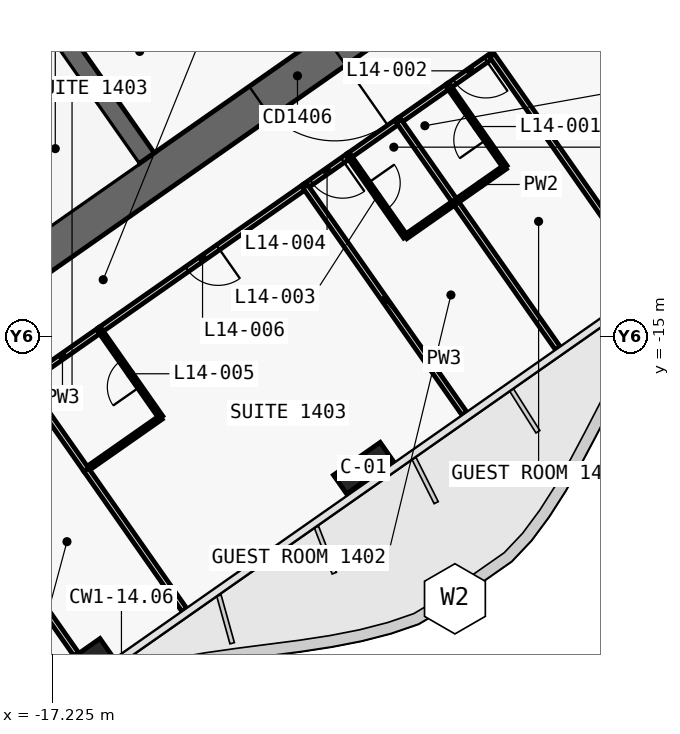
"""IFC4 building model, lengths in metres.
Left out: names, types, materials, properties, quantities, classifications, styles, units other than length and angle.
Written with IfcOpenShell. Run it as: python <this file> out.ifc"""

import sys

from ifc_helpers import new_model, si_unit, direction, frame, frame_2d, origin, origin_2d, place, context, subcontext, project, spatial, polyline, rectangle, outline, extrude, element, fill, save


model = new_model("IFC4")
c1 = context("Model", 3, precision=1e-05, world=origin(), true_north=direction((0.0, 1.0)))
c2 = subcontext(c1, "Body", "Model", "MODEL_VIEW")
j1 = project(units=[si_unit("LENGTHUNIT", "METRE"), si_unit("PLANEANGLEUNIT", "RADIAN")], contexts=[c1])
p1 = place(None, origin())
s1 = spatial("IfcSite", under=j1, at=p1, CompositionType="ELEMENT")
p2 = place(p1, origin())
s2 = spatial("IfcBuilding", under=s1, at=p2, CompositionType="ELEMENT")
p3 = place(p2, frame((0.0, 0.0, 76.1)))
s3 = spatial("IfcBuildingStorey", under=s2, at=p3, CompositionType="ELEMENT", Elevation=76.1)
p4 = place(p3, frame((0.037, 11.867, 0.0), z_axis=(0.0, 0.0, 1.0), x_axis=(-0.819155306259, -0.573571777746, 0.0)))
e1 = element("IfcWall", 1, at=p4, inside=s3, PredefinedType="SHEAR", context=c2, shape_type="SweptSolid", body=[
    extrude(outline(polyline([(33.837, 0.5), (0.7, 0.5), (0.0, -0.5), (33.837, -0.5), (33.837, 0.5)])), origin(), (0.0, 0.0, 1.0), 3.6),
])
p5 = place(p3, frame((0.037, -0.585, 0.0), z_axis=(0.0, 0.0, 1.0), x_axis=(-0.819157152511, -0.573569140985, 0.0)))
e2 = element("IfcWall", 2, at=p5, inside=s3, PredefinedType="SHEAR", context=c2, shape_type="SweptSolid", body=[
    extrude(outline(polyline([(26.695, 0.5), (0.7, 0.5), (0.0, -0.5), (26.695, -0.5), (26.695, 0.5)])), origin(), (0.0, 0.0, 1.0), 3.6),
])
p6 = place(p5, frame((2.995, 0.0, 0.0)))
e3 = element("IfcOpeningElement", 3, at=p6, cuts=e2, PredefinedType="OPENING", context=c2, shape_type="SweptSolid", body=[
    extrude(rectangle(XDim=2.4, YDim=2.1, at=frame_2d((1.2, 1.05))), frame((0.0, 0.51, 0.0), z_axis=(0.0, -1.0, 0.0), x_axis=(1.0, 0.0, 0.0)), (0.0, 0.0, 1.0), 1.02),
])
p7 = place(p5, frame((11.995, 0.0, 0.0)))
e4 = element("IfcOpeningElement", 4, at=p7, cuts=e2, PredefinedType="OPENING", context=c2, shape_type="SweptSolid", body=[
    extrude(rectangle(XDim=2.4, YDim=2.1, at=frame_2d((1.2, 1.05))), frame((0.0, 0.51, 0.0), z_axis=(0.0, -1.0, 0.0), x_axis=(1.0, 0.0, 0.0)), (0.0, 0.0, 1.0), 1.02),
])
p8 = place(p3, frame((-14.745, -10.324, 0.0), z_axis=(0.0, 0.0, 1.0), x_axis=(-0.57356780395, 0.819158088694, 0.0)))
e5 = element("IfcWall", 5, at=p8, inside=s3, PredefinedType="SHEAR", context=c2, shape_type="SweptSolid", body=[
    extrude(outline(polyline([(4.35, 0.25), (0.0, 0.25), (0.0, -0.25), (4.35, -0.25), (4.35, 0.25)])), origin(), (0.0, 0.0, 1.0), 3.6),
])
p9 = place(p3, frame((-2.638, 3.768, 0.0), z_axis=(0.0, 0.0, 1.0), x_axis=(-0.819148977158, -0.573580816643, 0.0)))
e6 = element("IfcWall", 6, at=p9, inside=s3, PredefinedType="SHEAR", context=c2, shape_type="SweptSolid", body=[
    extrude(outline(polyline([(26.0, 0.25), (0.0, 0.25), (0.0, -0.25), (26.0, -0.25), (26.0, 0.25)])), origin(), (0.0, 0.0, 1.0), 3.6),
])
p10 = place(p9, frame((1.169, 0.0, 0.0)))
e7 = element("IfcOpeningElement", 7, at=p10, cuts=e6, PredefinedType="OPENING", context=c2, shape_type="SweptSolid", body=[
    extrude(rectangle(XDim=1.1, YDim=2.1, at=frame_2d((0.55, 1.05))), frame((0.0, 0.26, 0.0), z_axis=(0.0, -1.0, 0.0), x_axis=(1.0, 0.0, 0.0)), (0.0, 0.0, 1.0), 0.52),
])
p11 = place(p9, frame((3.206, 0.0, 0.0)))
e8 = element("IfcOpeningElement", 8, at=p11, cuts=e6, PredefinedType="OPENING", context=c2, shape_type="SweptSolid", body=[
    extrude(rectangle(XDim=1.1, YDim=2.1, at=frame_2d((0.55, 1.05))), frame((0.0, 0.26, 0.0), z_axis=(0.0, -1.0, 0.0), x_axis=(1.0, 0.0, 0.0)), (0.0, 0.0, 1.0), 0.52),
])
p12 = place(p9, frame((5.244, 0.0, 0.0)))
e9 = element("IfcOpeningElement", 9, at=p12, cuts=e6, PredefinedType="OPENING", context=c2, shape_type="SweptSolid", body=[
    extrude(rectangle(XDim=1.1, YDim=2.1, at=frame_2d((0.55, 1.05))), frame((0.0, 0.26, 0.0), z_axis=(0.0, -1.0, 0.0), x_axis=(1.0, 0.0, 0.0)), (0.0, 0.0, 1.0), 0.52),
])
p13 = place(p9, frame((7.281, 0.0, 0.0)))
e10 = element("IfcOpeningElement", 10, at=p13, cuts=e6, PredefinedType="OPENING", context=c2, shape_type="SweptSolid", body=[
    extrude(rectangle(XDim=1.1, YDim=2.1, at=frame_2d((0.55, 1.05))), frame((0.0, 0.26, 0.0), z_axis=(0.0, -1.0, 0.0), x_axis=(1.0, 0.0, 0.0)), (0.0, 0.0, 1.0), 0.52),
])
p14 = place(p9, frame((9.688, 0.0, 0.0)))
e11 = element("IfcOpeningElement", 11, at=p14, cuts=e6, PredefinedType="OPENING", context=c2, shape_type="SweptSolid", body=[
    extrude(rectangle(XDim=1.1, YDim=2.1, at=frame_2d((0.55, 1.05))), frame((0.0, 0.26, 0.0), z_axis=(0.0, -1.0, 0.0), x_axis=(1.0, 0.0, 0.0)), (0.0, 0.0, 1.0), 0.52),
])
p15 = place(p9, frame((11.863, 0.0, 0.0)))
e12 = element("IfcOpeningElement", 12, at=p15, cuts=e6, PredefinedType="OPENING", context=c2, shape_type="SweptSolid", body=[
    extrude(rectangle(XDim=1.1, YDim=2.1, at=frame_2d((0.55, 1.05))), frame((0.0, 0.26, 0.0), z_axis=(0.0, -1.0, 0.0), x_axis=(1.0, 0.0, 0.0)), (0.0, 0.0, 1.0), 0.52),
])
p16 = place(p9, frame((14.038, 0.0, 0.0)))
e13 = element("IfcOpeningElement", 13, at=p16, cuts=e6, PredefinedType="OPENING", context=c2, shape_type="SweptSolid", body=[
    extrude(rectangle(XDim=1.1, YDim=2.1, at=frame_2d((0.55, 1.05))), frame((0.0, 0.26, 0.0), z_axis=(0.0, -1.0, 0.0), x_axis=(1.0, 0.0, 0.0)), (0.0, 0.0, 1.0), 0.52),
])
p17 = place(p9, frame((16.212, 0.0, 0.0)))
e14 = element("IfcOpeningElement", 14, at=p17, cuts=e6, PredefinedType="OPENING", context=c2, shape_type="SweptSolid", body=[
    extrude(rectangle(XDim=1.1, YDim=2.1, at=frame_2d((0.55, 1.05))), frame((0.0, 0.26, 0.0), z_axis=(0.0, -1.0, 0.0), x_axis=(1.0, 0.0, 0.0)), (0.0, 0.0, 1.0), 0.52),
])
for number, where, z_axis, x_axis in (
    (15, (-9.038, -18.475, 0.0), (0.0, 0.0, 1.0), (-0.819, -0.574, 0.0)),
    (16, (-16.41, -23.637, 0.0), (0.0, 0.0, 1.0), (-0.819, -0.574, 0.0)),
):
    element("IfcColumn", number, at=place(p3, frame(where, z_axis=z_axis, x_axis=x_axis)), inside=s3, PredefinedType="COLUMN", context=c2, shape_type="SweptSolid", body=[
        extrude(rectangle(XDim=1.5, YDim=0.6, at=origin_2d()), origin(), (0.0, 0.0, 1.0), 3.6),
    ])
p18 = place(p3, frame((-5.652, -7.62, 0.0), z_axis=(0.0, 0.0, 1.0), x_axis=(-0.819207359301, -0.573497430219, 0.0)))
e17 = element("IfcWall", 17, at=p18, inside=s3, PredefinedType="PARTITIONING", context=c2, shape_type="SweptSolid", body=[
    extrude(rectangle(XDim=1.401, YDim=0.15, at=frame_2d((0.7, 0.0))), origin(), (0.0, 0.0, 1.0), 2.6),
])
p19 = place(p18, frame((0.2, 0.0, 0.0)))
e18 = element("IfcOpeningElement", 18, at=p19, cuts=e17, PredefinedType="OPENING", context=c2, shape_type="SweptSolid", body=[
    extrude(rectangle(XDim=1.0, YDim=2.1, at=frame_2d((0.5, 1.05))), frame((0.0, 0.085, 0.0), z_axis=(0.0, -1.0, 0.0), x_axis=(1.0, 0.0, 0.0)), (0.0, 0.0, 1.0), 0.17),
])
p20 = place(p3, frame((-6.797, -8.421, 0.0), z_axis=(0.0, 0.0, 1.0), x_axis=(-0.8190674132, -0.573697283098, 0.0)))
e19 = element("IfcWall", 19, at=p20, inside=s3, PredefinedType="PARTITIONING", context=c2, shape_type="SweptSolid", body=[
    extrude(rectangle(XDim=1.604, YDim=0.15, at=frame_2d((0.802, 0.0))), origin(), (0.0, 0.0, 1.0), 3.32),
])
p21 = place(p3, frame((-9.419, -10.258, 0.0), z_axis=(0.0, 0.0, 1.0), x_axis=(-0.81914197737, -0.573590813132, 0.0)))
e20 = element("IfcWall", 20, at=p21, inside=s3, PredefinedType="PARTITIONING", context=c2, shape_type="SweptSolid", body=[
    extrude(rectangle(XDim=1.403, YDim=0.15, at=frame_2d((0.701, 0.0))), origin(), (0.0, 0.0, 1.0), 3.32),
])
p22 = place(p21, frame((0.201, 0.0, 0.0)))
e21 = element("IfcOpeningElement", 21, at=p22, cuts=e20, PredefinedType="OPENING", context=c2, shape_type="SweptSolid", body=[
    extrude(rectangle(XDim=1.0, YDim=2.1, at=frame_2d((0.5, 1.05))), frame((0.0, 0.085, 0.0), z_axis=(0.0, -1.0, 0.0), x_axis=(1.0, 0.0, 0.0)), (0.0, 0.0, 1.0), 0.17),
])
p23 = place(p3, frame((-8.107, -9.339, 0.0), z_axis=(0.0, 0.0, 1.0), x_axis=(-0.819117502046, -0.573625764625, 0.0)))
e22 = element("IfcWall", 22, at=p23, inside=s3, PredefinedType="PARTITIONING", context=c2, shape_type="SweptSolid", body=[
    extrude(rectangle(XDim=1.604, YDim=0.15, at=frame_2d((0.802, 0.0))), origin(), (0.0, 0.0, 1.0), 3.32),
])
p24 = place(p3, frame((-10.565, -11.06, 0.0), z_axis=(0.0, 0.0, 1.0), x_axis=(-0.819153746897, -0.573574004767, 0.0)))
e23 = element("IfcWall", 23, at=p24, inside=s3, PredefinedType="PARTITIONING", context=c2, shape_type="SweptSolid", body=[
    extrude(rectangle(XDim=6.603, YDim=0.15, at=frame_2d((3.302, 0.0))), origin(), (0.0, 0.0, 1.0), 2.6),
])
p25 = place(p24, frame((2.802, 0.0, 0.0)))
e24 = element("IfcOpeningElement", 24, at=p25, cuts=e23, PredefinedType="OPENING", context=c2, shape_type="SweptSolid", body=[
    extrude(rectangle(XDim=1.0, YDim=2.1, at=frame_2d((0.5, 1.05))), frame((0.0, 0.085, 0.0), z_axis=(0.0, -1.0, 0.0), x_axis=(1.0, 0.0, 0.0)), (0.0, 0.0, 1.0), 0.17),
])
p26 = place(p3, frame((-15.971, -14.846, 0.0), z_axis=(0.0, 0.0, 1.0), x_axis=(-0.81922714955, -0.573469159974, 0.0)))
e25 = element("IfcWall", 25, at=p26, inside=s3, PredefinedType="PARTITIONING", context=c2, shape_type="SweptSolid", body=[
    extrude(rectangle(XDim=2.404, YDim=0.15, at=frame_2d((1.202, 0.0))), origin(), (0.0, 0.0, 1.0), 3.32),
])
p27 = place(p3, frame((-1.849, -13.051, 0.0), z_axis=(0.0, 0.0, 1.0), x_axis=(-0.573575988258, 0.819152358047, 0.0)))
e26 = element("IfcWall", 26, at=p27, inside=s3, PredefinedType="PARTITIONING", context=c2, shape_type="SweptSolid", body=[
    extrude(rectangle(XDim=6.632, YDim=0.15, at=frame_2d((3.316, 0.0))), origin(), (0.0, 0.0, 1.0), 2.6),
])
p28 = place(p3, frame((-6.617, -11.471, 0.0), z_axis=(0.0, 0.0, 1.0), x_axis=(0.819131543282, 0.57360571371, 0.0)))
e27 = element("IfcWall", 27, at=p28, inside=s3, PredefinedType="PARTITIONING", context=c2, shape_type="SweptSolid", body=[
    extrude(rectangle(XDim=1.6, YDim=0.12, at=frame_2d((0.8, 0.0))), origin(), (0.0, 0.0, 1.0), 3.32),
])
p29 = place(p3, frame((-5.306, -10.552, 0.0), z_axis=(0.0, 0.0, 1.0), x_axis=(-0.573537965655, 0.819178980414, 0.0)))
e28 = element("IfcWall", 28, at=p29, inside=s3, PredefinedType="PARTITIONING", context=c2, shape_type="SweptSolid", body=[
    extrude(rectangle(XDim=2.6, YDim=0.12, at=frame_2d((1.3, 0.0))), origin(), (0.0, 0.0, 1.0), 3.32),
])
p30 = place(p29, frame((0.875, 0.0, 0.0)))
e29 = element("IfcOpeningElement", 29, at=p30, cuts=e28, PredefinedType="OPENING", context=c2, shape_type="SweptSolid", body=[
    extrude(rectangle(XDim=0.85, YDim=2.05, at=frame_2d((0.425, 1.025))), frame((0.0, 0.07, 0.0), z_axis=(0.0, -1.0, 0.0), x_axis=(1.0, 0.0, 0.0)), (0.0, 0.0, 1.0), 0.14),
])
p31 = place(p3, frame((-3.922, -15.32, 0.0), z_axis=(0.0, 0.0, 1.0), x_axis=(-0.573535567792, 0.819180659243, 0.0)))
e30 = element("IfcWall", 30, at=p31, inside=s3, PredefinedType="PARTITIONING", context=c2, shape_type="SweptSolid", body=[
    extrude(rectangle(XDim=4.699, YDim=0.15, at=frame_2d((2.35, 0.0))), origin(), (0.0, 0.0, 1.0), 2.5),
])
p32 = place(p3, frame((-6.618, -11.47, 0.0), z_axis=(0.0, 0.0, 1.0), x_axis=(-0.573537965655, 0.819178980414, 0.0)))
e31 = element("IfcWall", 31, at=p32, inside=s3, PredefinedType="PARTITIONING", context=c2, shape_type="SweptSolid", body=[
    extrude(rectangle(XDim=2.6, YDim=0.15, at=frame_2d((1.3, 0.0))), origin(), (0.0, 0.0, 1.0), 3.32),
])
p33 = place(p3, frame((-9.421, -10.259, 0.0), z_axis=(0.0, 0.0, 1.0), x_axis=(0.573645091666, -0.819103967032, 0.0)))
e32 = element("IfcWall", 32, at=p33, inside=s3, PredefinedType="PARTITIONING", context=c2, shape_type="SweptSolid", body=[
    extrude(rectangle(XDim=2.6, YDim=0.12, at=frame_2d((1.3, 0.0))), origin(), (0.0, 0.0, 1.0), 3.32),
])
p34 = place(p33, frame((0.875, 0.0, 0.0)))
e33 = element("IfcOpeningElement", 33, at=p34, cuts=e32, PredefinedType="OPENING", context=c2, shape_type="SweptSolid", body=[
    extrude(rectangle(XDim=0.85, YDim=2.05, at=frame_2d((0.425, 1.025))), frame((0.0, 0.07, 0.0), z_axis=(0.0, -1.0, 0.0), x_axis=(1.0, 0.0, 0.0)), (0.0, 0.0, 1.0), 0.14),
])
p35 = place(p3, frame((-7.928, -12.389, 0.0), z_axis=(0.0, 0.0, 1.0), x_axis=(0.81918174131, 0.573534022273, 0.0)))
e34 = element("IfcWall", 34, at=p35, inside=s3, PredefinedType="PARTITIONING", context=c2, shape_type="SweptSolid", body=[
    extrude(rectangle(XDim=1.6, YDim=0.12, at=frame_2d((0.8, 0.0))), origin(), (0.0, 0.0, 1.0), 3.32),
])
p36 = place(p3, frame((-6.379, -17.041, 0.0), z_axis=(0.0, 0.0, 1.0), x_axis=(-0.573579051994, 0.81915021279, 0.0)))
e35 = element("IfcWall", 35, at=p36, inside=s3, PredefinedType="PARTITIONING", context=c2, shape_type="SweptSolid", body=[
    extrude(rectangle(XDim=7.3, YDim=0.15, at=frame_2d((3.65, 0.0))), origin(), (0.0, 0.0, 1.0), 2.5),
])
p37 = place(p3, frame((-16.332, -18.518, 0.0), z_axis=(0.0, 0.0, 1.0), x_axis=(0.819155442668, 0.573571582932, 0.0)))
e36 = element("IfcWall", 36, at=p37, inside=s3, PredefinedType="PARTITIONING", context=c2, shape_type="SweptSolid", body=[
    extrude(rectangle(XDim=2.4, YDim=0.12, at=frame_2d((1.2, 0.0))), origin(), (0.0, 0.0, 1.0), 3.32),
])
p38 = place(p3, frame((-14.366, -17.14, 0.0), z_axis=(0.0, 0.0, 1.0), x_axis=(-0.573550118428, 0.819170471667, 0.0)))
e37 = element("IfcWall", 37, at=p38, inside=s3, PredefinedType="PARTITIONING", context=c2, shape_type="SweptSolid", body=[
    extrude(rectangle(XDim=2.8, YDim=0.12, at=frame_2d((1.4, 0.0))), origin(), (0.0, 0.0, 1.0), 3.32),
])
p39 = place(p38, frame((0.975, 0.0, 0.0)))
e38 = element("IfcOpeningElement", 38, at=p39, cuts=e37, PredefinedType="OPENING", context=c2, shape_type="SweptSolid", body=[
    extrude(rectangle(XDim=0.85, YDim=2.05, at=frame_2d((0.425, 1.025))), frame((0.0, 0.07, 0.0), z_axis=(0.0, -1.0, 0.0), x_axis=(1.0, 0.0, 0.0)), (0.0, 0.0, 1.0), 0.14),
])
p40 = place(p3, frame((-13.752, -22.203, 0.0), z_axis=(0.0, 0.0, 1.0), x_axis=(-0.573564311442, 0.819160534108, 0.0)))
e39 = element("IfcWall", 39, at=p40, inside=s3, PredefinedType="PARTITIONING", context=c2, shape_type="SweptSolid", body=[
    extrude(rectangle(XDim=4.499, YDim=0.15, at=frame_2d((2.25, 0.0))), origin(), (0.0, 0.0, 1.0), 2.5),
])
p41 = place(p3, frame((-16.333, -18.517, 0.0), z_axis=(0.0, 0.0, 1.0), x_axis=(-0.573591086599, 0.819141785879, 0.0)))
e40 = element("IfcWall", 40, at=p41, inside=s3, PredefinedType="PARTITIONING", context=c2, shape_type="SweptSolid", body=[
    extrude(rectangle(XDim=2.8, YDim=0.15, at=frame_2d((1.4, 0.0))), origin(), (0.0, 0.0, 1.0), 3.32),
])
p42 = place(p3, frame((-16.594, -23.375, 0.0), z_axis=(0.0, 0.0, 1.0), x_axis=(-0.57359826181, 0.819136761505, 0.0)))
e41 = element("IfcWall", 41, at=p42, inside=s3, PredefinedType="PARTITIONING", context=c2, shape_type="SweptSolid", body=[
    extrude(rectangle(XDim=6.63, YDim=0.15, at=frame_2d((3.315, 0.0))), origin(), (0.0, 0.0, 1.0), 2.6),
])
p43 = place(p7, origin())
e42 = element("IfcDoor", 42, at=p43, inside=s3, OperationType="DOUBLE_DOOR_SINGLE_SWING", PredefinedType="DOOR", context=c2, shape_type="SweptSolid", body=[
    extrude(rectangle(XDim=2.4, YDim=2.1, at=frame_2d((1.2, 1.05))), frame((0.0, 0.025, 0.0), z_axis=(0.0, -1.0, 0.0), x_axis=(1.0, 0.0, 0.0)), (0.0, 0.0, 1.0), 0.05),
])
fill(e4, e42)
p44 = place(p30, origin())
e43 = element("IfcDoor", 43, at=p44, inside=s3, OperationType="SINGLE_SWING_RIGHT", PredefinedType="DOOR", context=c2, shape_type="SweptSolid", body=[
    extrude(rectangle(XDim=0.85, YDim=2.05, at=frame_2d((0.425, 1.025))), frame((0.0, 0.025, 0.0), z_axis=(0.0, -1.0, 0.0), x_axis=(1.0, 0.0, 0.0)), (0.0, 0.0, 1.0), 0.05),
])
fill(e29, e43)
p45 = place(p19, origin())
e44 = element("IfcDoor", 44, at=p45, inside=s3, OperationType="SINGLE_SWING_LEFT", PredefinedType="DOOR", context=c2, shape_type="SweptSolid", body=[
    extrude(rectangle(XDim=1.0, YDim=2.1, at=frame_2d((0.5, 1.05))), frame((0.0, 0.025, 0.0), z_axis=(0.0, -1.0, 0.0), x_axis=(1.0, 0.0, 0.0)), (0.0, 0.0, 1.0), 0.05),
])
fill(e18, e44)
p46 = place(p34, origin())
e45 = element("IfcDoor", 45, at=p46, inside=s3, OperationType="SINGLE_SWING_RIGHT", PredefinedType="DOOR", context=c2, shape_type="SweptSolid", body=[
    extrude(rectangle(XDim=0.85, YDim=2.05, at=frame_2d((0.425, 1.025))), frame((0.0, 0.025, 0.0), z_axis=(0.0, -1.0, 0.0), x_axis=(1.0, 0.0, 0.0)), (0.0, 0.0, 1.0), 0.05),
])
fill(e33, e45)
p47 = place(p22, origin())
e46 = element("IfcDoor", 46, at=p47, inside=s3, OperationType="SINGLE_SWING_LEFT", PredefinedType="DOOR", context=c2, shape_type="SweptSolid", body=[
    extrude(rectangle(XDim=1.0, YDim=2.1, at=frame_2d((0.5, 1.05))), frame((0.0, 0.025, 0.0), z_axis=(0.0, -1.0, 0.0), x_axis=(1.0, 0.0, 0.0)), (0.0, 0.0, 1.0), 0.05),
])
fill(e21, e46)
p48 = place(p39, origin())
e47 = element("IfcDoor", 47, at=p48, inside=s3, OperationType="SINGLE_SWING_LEFT", PredefinedType="DOOR", context=c2, shape_type="SweptSolid", body=[
    extrude(rectangle(XDim=0.85, YDim=2.05, at=frame_2d((0.425, 1.025))), frame((0.0, 0.025, 0.0), z_axis=(0.0, -1.0, 0.0), x_axis=(1.0, 0.0, 0.0)), (0.0, 0.0, 1.0), 0.05),
])
fill(e38, e47)
p49 = place(p25, origin())
e48 = element("IfcDoor", 48, at=p49, inside=s3, OperationType="SINGLE_SWING_LEFT", PredefinedType="DOOR", context=c2, shape_type="SweptSolid", body=[
    extrude(rectangle(XDim=1.0, YDim=2.1, at=frame_2d((0.5, 1.05))), frame((0.0, 0.025, 0.0), z_axis=(0.0, -1.0, 0.0), x_axis=(1.0, 0.0, 0.0)), (0.0, 0.0, 1.0), 0.05),
])
fill(e24, e48)
save(model, sys.argv[1])
